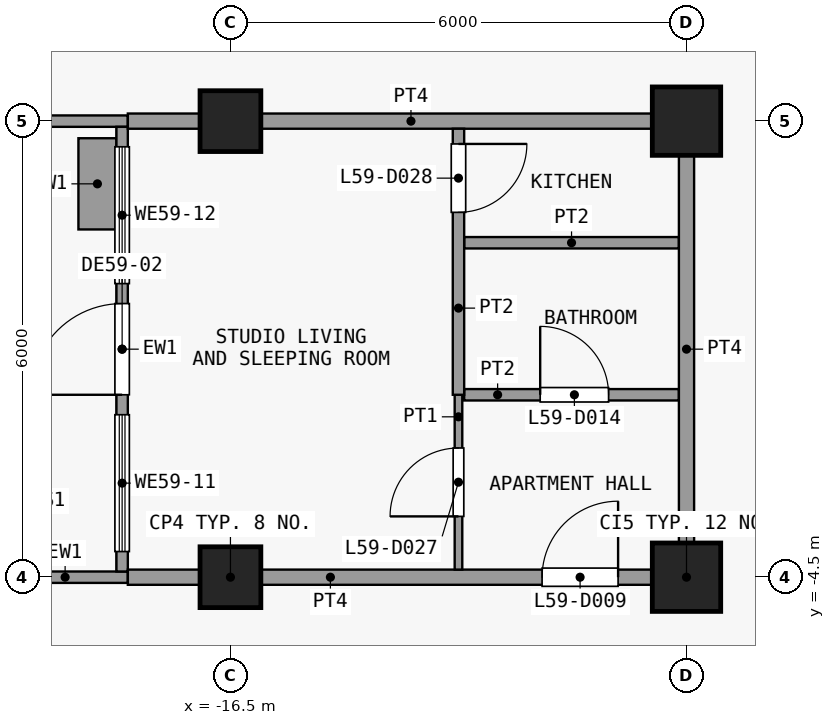
"""IFC4 building model, lengths in metres.
Left out: names, types, materials, properties, quantities, classifications, styles, units other than length and angle.
Written with IfcOpenShell. Run it as: python <this file> out.ifc"""

import sys

from ifc_helpers import new_model, si_unit, direction, frame, frame_2d, origin, origin_2d, place, context, subcontext, project, spatial, rectangle, extrude, element, fill, save


model = new_model("IFC4")
c1 = context("Model", 3, precision=1e-05, world=origin(), true_north=direction((0.0, 1.0)))
c2 = subcontext(c1, "Body", "Model", "MODEL_VIEW")
j1 = project(units=[si_unit("LENGTHUNIT", "METRE"), si_unit("PLANEANGLEUNIT", "RADIAN")], contexts=[c1])
p1 = place(None, origin())
s1 = spatial("IfcSite", under=j1, at=p1, CompositionType="ELEMENT")
p2 = place(p1, origin())
s2 = spatial("IfcBuilding", under=s1, at=p2, CompositionType="ELEMENT")
p3 = place(p2, frame((0.0, 0.0, 233.9)))
s3 = spatial("IfcBuildingStorey", under=s2, at=p3, CompositionType="ELEMENT", Elevation=233.9)
for number, where, z_axis, x_axis in (
    (1, (-16.5, -4.5, 0.0), (0.0, 0.0, 1.0), (1.0, 0.0, 0.0)),
    (2, (-16.5, 1.5, 0.0), (0.0, 0.0, 1.0), (1.0, 0.0, 0.0)),
):
    element("IfcColumn", number, at=place(p3, frame(where, z_axis=z_axis, x_axis=x_axis)), inside=s3, PredefinedType="COLUMN", context=c2, shape_type="SweptSolid", body=[
        extrude(rectangle(XDim=0.8, YDim=0.8, at=origin_2d()), origin(), (0.0, 0.0, 1.0), 3.6),
    ])
for number, where, z_axis, x_axis in (
    (3, (-10.5, -4.5, 0.0), (0.0, 0.0, 1.0), (1.0, 0.0, 0.0)),
    (4, (-10.5, 1.5, 0.0), (0.0, 0.0, 1.0), (1.0, 0.0, 0.0)),
):
    element("IfcColumn", number, at=place(p3, frame(where, z_axis=z_axis, x_axis=x_axis)), inside=s3, PredefinedType="COLUMN", context=c2, shape_type="SweptSolid", body=[
        extrude(rectangle(XDim=0.9, YDim=0.9, at=origin_2d()), origin(), (0.0, 0.0, 1.0), 3.6),
    ])
p4 = place(p3, frame((-17.85, -4.5, 0.0), z_axis=(0.0, 0.0, 1.0), x_axis=(-1.0, 0.0, 0.0)))
e5 = element("IfcWall", 5, at=p4, inside=s3, PredefinedType="SOLIDWALL", context=c2, shape_type="SweptSolid", body=[
    extrude(rectangle(XDim=1.65, YDim=0.15, at=frame_2d((0.825, 0.0))), origin(), (0.0, 0.0, 1.0), 3.3),
])
p5 = place(p3, frame((-17.85, 1.5, 0.0), z_axis=(0.0, 0.0, 1.0), x_axis=(-1.0, 0.0, 0.0)))
e6 = element("IfcWall", 6, at=p5, inside=s3, PredefinedType="SOLIDWALL", context=c2, shape_type="SweptSolid", body=[
    extrude(rectangle(XDim=2.55, YDim=0.15, at=frame_2d((1.275, 0.0))), origin(), (0.0, 0.0, 1.0), 3.3),
])
p6 = place(p3, frame((-17.925, -4.425, 0.0), z_axis=(0.0, 0.0, 1.0), x_axis=(0.0, 1.0, 0.0)))
e7 = element("IfcWall", 7, at=p6, inside=s3, PredefinedType="SOLIDWALL", context=c2, shape_type="SweptSolid", body=[
    extrude(rectangle(XDim=5.85, YDim=0.15, at=frame_2d((2.925, 0.0))), origin(), (0.0, 0.0, 1.0), 3.3),
])
p7 = place(p6, frame((2.325, 0.0, 0.0)))
e8 = element("IfcOpeningElement", 8, at=p7, cuts=e7, PredefinedType="OPENING", context=c2, shape_type="SweptSolid", body=[
    extrude(rectangle(XDim=1.2, YDim=2.4, at=frame_2d((0.6, 1.2))), frame((0.0, 0.085, 0.0), z_axis=(0.0, -1.0, 0.0), x_axis=(1.0, 0.0, 0.0)), (0.0, 0.0, 1.0), 0.17),
])
p8 = place(p6, frame((0.262, 0.0, 0.9)))
e9 = element("IfcOpeningElement", 9, at=p8, cuts=e7, PredefinedType="OPENING", context=c2, shape_type="SweptSolid", body=[
    extrude(rectangle(XDim=1.8, YDim=2.1, at=frame_2d((0.9, 1.05))), frame((0.0, 0.085, 0.0), z_axis=(0.0, -1.0, 0.0), x_axis=(1.0, 0.0, 0.0)), (0.0, 0.0, 1.0), 0.17),
])
p9 = place(p6, frame((3.788, 0.0, 0.9)))
e10 = element("IfcOpeningElement", 10, at=p9, cuts=e7, PredefinedType="OPENING", context=c2, shape_type="SweptSolid", body=[
    extrude(rectangle(XDim=1.8, YDim=2.1, at=frame_2d((0.9, 1.05))), frame((0.0, 0.085, 0.0), z_axis=(0.0, -1.0, 0.0), x_axis=(1.0, 0.0, 0.0)), (0.0, 0.0, 1.0), 0.17),
])
p10 = place(p3, frame((-18.25, 0.075, 0.0), z_axis=(0.0, 0.0, 1.0), x_axis=(0.0, 1.0, 0.0)))
e11 = element("IfcWall", 11, at=p10, inside=s3, PredefinedType="USERDEFINED", context=c2, shape_type="SweptSolid", body=[
    extrude(rectangle(XDim=1.2, YDim=0.5, at=frame_2d((0.6, 0.0))), origin(), (0.0, 0.0, 1.0), 0.9),
])
p11 = place(p3, frame((-17.85, -4.5, 0.0), z_axis=(0.0, 0.0, 1.0), x_axis=(1.0, 0.0, 0.0)))
e12 = element("IfcWall", 12, at=p11, inside=s3, PredefinedType="PARTITIONING", context=c2, shape_type="SweptSolid", body=[
    extrude(rectangle(XDim=7.45, YDim=0.2, at=frame_2d((3.725, 0.0))), origin(), (0.0, 0.0, 1.0), 3.3),
])
p12 = place(p11, frame((5.45, 0.0, 0.0)))
e13 = element("IfcOpeningElement", 13, at=p12, cuts=e12, PredefinedType="OPENING", context=c2, shape_type="SweptSolid", body=[
    extrude(rectangle(XDim=1.0, YDim=2.1, at=frame_2d((0.5, 1.05))), frame((0.0, 0.11, 0.0), z_axis=(0.0, -1.0, 0.0), x_axis=(1.0, 0.0, 0.0)), (0.0, 0.0, 1.0), 0.22),
])
p13 = place(p3, frame((-13.425, -2.1, 0.0), z_axis=(0.0, 0.0, 1.0), x_axis=(1.0, 0.0, 0.0)))
e14 = element("IfcWall", 14, at=p13, inside=s3, PredefinedType="PARTITIONING", context=c2, shape_type="SweptSolid", body=[
    extrude(rectangle(XDim=2.825, YDim=0.15, at=frame_2d((1.413, 0.0))), origin(), (0.0, 0.0, 1.0), 3.3),
])
p14 = place(p13, frame((1.0, 0.0, 0.0)))
e15 = element("IfcOpeningElement", 15, at=p14, cuts=e14, PredefinedType="OPENING", context=c2, shape_type="SweptSolid", body=[
    extrude(rectangle(XDim=0.9, YDim=2.1, at=frame_2d((0.45, 1.05))), frame((0.0, 0.085, 0.0), z_axis=(0.0, -1.0, 0.0), x_axis=(1.0, 0.0, 0.0)), (0.0, 0.0, 1.0), 0.17),
])
p15 = place(p3, frame((-13.425, -0.1, 0.0), z_axis=(0.0, 0.0, 1.0), x_axis=(1.0, 0.0, 0.0)))
e16 = element("IfcWall", 16, at=p15, inside=s3, PredefinedType="PARTITIONING", context=c2, shape_type="SweptSolid", body=[
    extrude(rectangle(XDim=2.825, YDim=0.15, at=frame_2d((1.413, 0.0))), origin(), (0.0, 0.0, 1.0), 3.3),
])
p16 = place(p3, frame((-17.85, 1.5, 0.0), z_axis=(0.0, 0.0, 1.0), x_axis=(1.0, 0.0, 0.0)))
e17 = element("IfcWall", 17, at=p16, inside=s3, PredefinedType="PARTITIONING", context=c2, shape_type="SweptSolid", body=[
    extrude(rectangle(XDim=7.45, YDim=0.2, at=frame_2d((3.725, 0.0))), origin(), (0.0, 0.0, 1.0), 3.3),
])
p17 = place(p3, frame((-13.5, -4.4, 0.0), z_axis=(0.0, 0.0, 1.0), x_axis=(0.0, 1.0, 0.0)))
e18 = element("IfcWall", 18, at=p17, inside=s3, PredefinedType="PARTITIONING", context=c2, shape_type="SweptSolid", body=[
    extrude(rectangle(XDim=2.3, YDim=0.1, at=frame_2d((1.15, 0.0))), origin(), (0.0, 0.0, 1.0), 3.3),
])
p18 = place(p17, frame((0.7, 0.0, 0.0)))
e19 = element("IfcOpeningElement", 19, at=p18, cuts=e18, PredefinedType="OPENING", context=c2, shape_type="SweptSolid", body=[
    extrude(rectangle(XDim=0.9, YDim=2.1, at=frame_2d((0.45, 1.05))), frame((0.0, 0.06, 0.0), z_axis=(0.0, -1.0, 0.0), x_axis=(1.0, 0.0, 0.0)), (0.0, 0.0, 1.0), 0.12),
])
p19 = place(p3, frame((-13.5, -2.1, 0.0), z_axis=(0.0, 0.0, 1.0), x_axis=(0.0, 1.0, 0.0)))
e20 = element("IfcWall", 20, at=p19, inside=s3, PredefinedType="PARTITIONING", context=c2, shape_type="SweptSolid", body=[
    extrude(rectangle(XDim=3.5, YDim=0.15, at=frame_2d((1.75, 0.0))), origin(), (0.0, 0.0, 1.0), 3.3),
])
p20 = place(p19, frame((2.4, 0.0, 0.0)))
e21 = element("IfcOpeningElement", 21, at=p20, cuts=e20, PredefinedType="OPENING", context=c2, shape_type="SweptSolid", body=[
    extrude(rectangle(XDim=0.9, YDim=2.1, at=frame_2d((0.45, 1.05))), frame((0.0, 0.085, 0.0), z_axis=(0.0, -1.0, 0.0), x_axis=(1.0, 0.0, 0.0)), (0.0, 0.0, 1.0), 0.17),
])
p21 = place(p3, frame((-10.5, -4.4, 0.0), z_axis=(0.0, 0.0, 1.0), x_axis=(0.0, 1.0, 0.0)))
e22 = element("IfcWall", 22, at=p21, inside=s3, PredefinedType="PARTITIONING", context=c2, shape_type="SweptSolid", body=[
    extrude(rectangle(XDim=5.8, YDim=0.2, at=frame_2d((2.9, 0.0))), origin(), (0.0, 0.0, 1.0), 3.3),
])
p22 = place(p7, origin())
e23 = element("IfcDoor", 23, at=p22, inside=s3, OperationType="SINGLE_SWING_LEFT", PredefinedType="DOOR", context=c2, shape_type="SweptSolid", body=[
    extrude(rectangle(XDim=1.2, YDim=2.4, at=frame_2d((0.6, 1.2))), frame((0.0, 0.025, 0.0), z_axis=(0.0, -1.0, 0.0), x_axis=(1.0, 0.0, 0.0)), (0.0, 0.0, 1.0), 0.05),
])
fill(e8, e23)
p23 = place(p8, origin())
e24 = element("IfcWindow", 24, at=p23, inside=s3, PartitioningType="SINGLE_PANEL", PredefinedType="WINDOW", context=c2, shape_type="SweptSolid", body=[
    extrude(rectangle(XDim=1.8, YDim=2.1, at=frame_2d((0.9, 1.05))), frame((0.0, 0.03, 0.0), z_axis=(0.0, -1.0, 0.0), x_axis=(1.0, 0.0, 0.0)), (0.0, 0.0, 1.0), 0.06),
])
fill(e9, e24)
p24 = place(p9, origin())
e25 = element("IfcWindow", 25, at=p24, inside=s3, PartitioningType="SINGLE_PANEL", PredefinedType="WINDOW", context=c2, shape_type="SweptSolid", body=[
    extrude(rectangle(XDim=1.8, YDim=2.1, at=frame_2d((0.9, 1.05))), frame((0.0, 0.03, 0.0), z_axis=(0.0, -1.0, 0.0), x_axis=(1.0, 0.0, 0.0)), (0.0, 0.0, 1.0), 0.06),
])
fill(e10, e25)
p25 = place(p12, origin())
e26 = element("IfcDoor", 26, at=p25, inside=s3, OperationType="SINGLE_SWING_LEFT", PredefinedType="DOOR", context=c2, shape_type="SweptSolid", body=[
    extrude(rectangle(XDim=1.0, YDim=2.1, at=frame_2d((0.5, 1.05))), frame((0.0, 0.025, 0.0), z_axis=(0.0, -1.0, 0.0), x_axis=(1.0, 0.0, 0.0)), (0.0, 0.0, 1.0), 0.05),
])
fill(e13, e26)
p26 = place(p14, origin())
e27 = element("IfcDoor", 27, at=p26, inside=s3, OperationType="SINGLE_SWING_RIGHT", PredefinedType="DOOR", context=c2, shape_type="SweptSolid", body=[
    extrude(rectangle(XDim=0.9, YDim=2.1, at=frame_2d((0.45, 1.05))), frame((0.0, 0.025, 0.0), z_axis=(0.0, -1.0, 0.0), x_axis=(1.0, 0.0, 0.0)), (0.0, 0.0, 1.0), 0.05),
])
fill(e15, e27)
p27 = place(p18, origin())
e28 = element("IfcDoor", 28, at=p27, inside=s3, OperationType="SINGLE_SWING_RIGHT", PredefinedType="DOOR", context=c2, shape_type="SweptSolid", body=[
    extrude(rectangle(XDim=0.9, YDim=2.1, at=frame_2d((0.45, 1.05))), frame((0.0, 0.025, 0.0), z_axis=(0.0, -1.0, 0.0), x_axis=(1.0, 0.0, 0.0)), (0.0, 0.0, 1.0), 0.05),
])
fill(e19, e28)
p28 = place(p20, origin())
e29 = element("IfcDoor", 29, at=p28, inside=s3, OperationType="SINGLE_SWING_RIGHT", PredefinedType="DOOR", context=c2, shape_type="SweptSolid", body=[
    extrude(rectangle(XDim=0.9, YDim=2.1, at=frame_2d((0.45, 1.05))), frame((0.0, 0.025, 0.0), z_axis=(0.0, -1.0, 0.0), x_axis=(1.0, 0.0, 0.0)), (0.0, 0.0, 1.0), 0.05),
])
fill(e21, e29)
save(model, sys.argv[1])
